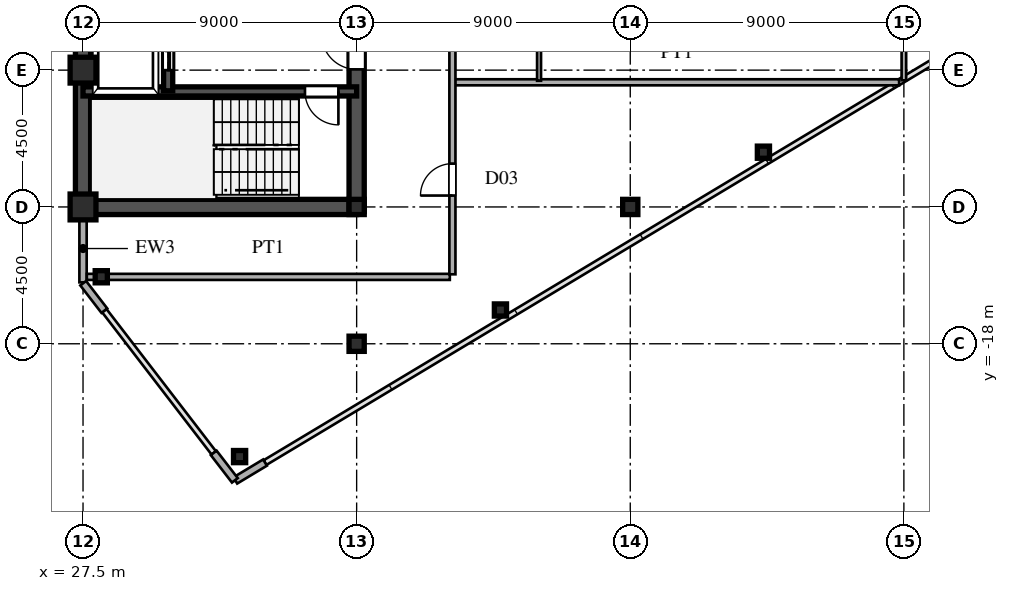
"""IFC4 building model, lengths in metres.
Left out: names, types, materials, properties, quantities, classifications, styles, units other than length and angle.
Written with IfcOpenShell. Run it as: python <this file> out.ifc"""

import sys

from ifc_helpers import new_model, si_unit, direction, frame, frame_2d, origin, origin_2d, place, context, subcontext, project, spatial, rectangle, hollow_rectangle, i_section, extrude, source, transform, mapped, element, fill, save


model = new_model("IFC4")
c1 = context("Model", 3, precision=1e-05, world=origin(), true_north=direction((0.0, 1.0)))
c2 = subcontext(c1, "Body", "Model", "MODEL_VIEW")
j1 = project(units=[si_unit("LENGTHUNIT", "METRE"), si_unit("PLANEANGLEUNIT", "RADIAN")], contexts=[c1])
p1 = place(None, origin())
s1 = spatial("IfcSite", under=j1, at=p1, CompositionType="ELEMENT")
p2 = place(p1, origin())
s2 = spatial("IfcBuilding", under=s1, at=p2, CompositionType="ELEMENT")
p3 = place(p2, frame((0.0, 0.0, 210.3)))
s3 = spatial("IfcBuildingStorey", under=s2, at=p3, CompositionType="ELEMENT", Elevation=210.3)
m1 = source(origin(), c2, "Body", "SweptSolid", [
    extrude(hollow_rectangle(XDim=0.85, YDim=0.85, WallThickness=0.036, at=origin_2d()), origin(), (0.0, 0.0, 1.0), 3.6),
])
for number, where, z_axis, x_axis in (
    (1, (27.5, -13.5, 0.0), (0.0, 0.0, 1.0), (1.0, 0.0, 0.0)),
    (2, (27.5, -9.0, 0.0), (0.0, 0.0, 1.0), (1.0, 0.0, 0.0)),
):
    element("IfcColumn", number, at=place(p3, frame(where, z_axis=z_axis, x_axis=x_axis)), inside=s3, PredefinedType="COLUMN", context=c2, shape_type="MappedRepresentation", body=[
        mapped(m1, transform((0.0, 0.0, 0.0), scale=1.0)),
    ])
m2 = source(origin(), c2, "Body", "SweptSolid", [
    extrude(i_section(OverallWidth=0.5, OverallDepth=0.5, WebThickness=0.02, FlangeThickness=0.032, at=origin_2d()), origin(), (0.0, 0.0, 1.0), 3.6),
])
for number, where, z_axis, x_axis in (
    (3, (36.5, -18.0, 0.0), (0.0, 0.0, 1.0), (1.0, 0.0, 0.0)),
    (4, (36.5, -13.5, 0.0), (0.0, 0.0, 1.0), (1.0, 0.0, 0.0)),
    (5, (45.5, -13.5, 0.0), (0.0, 0.0, 1.0), (1.0, 0.0, 0.0)),
):
    element("IfcColumn", number, at=place(p3, frame(where, z_axis=z_axis, x_axis=x_axis)), inside=s3, PredefinedType="COLUMN", context=c2, shape_type="MappedRepresentation", body=[
        mapped(m2, transform((0.0, 0.0, 0.0), scale=1.0)),
    ])
m3 = source(origin(), c2, "Body", "SweptSolid", [
    extrude(hollow_rectangle(XDim=0.4, YDim=0.4, WallThickness=0.016, at=origin_2d()), origin(), (0.0, 0.0, 1.0), 3.6),
])
for number, where, z_axis, x_axis in (
    (6, (32.65, -21.71, 0.0), (0.0, 0.0, 1.0), (1.0, 0.0, 0.0)),
    (7, (28.1, -15.796, 0.0), (0.0, 0.0, 1.0), (1.0, 0.0, 0.0)),
    (8, (41.23, -16.889, 0.0), (0.0, 0.0, 1.0), (1.0, 0.0, 0.0)),
    (9, (49.88, -11.699, 0.0), (0.0, 0.0, 1.0), (1.0, 0.0, 0.0)),
):
    element("IfcColumn", number, at=place(p3, frame(where, z_axis=z_axis, x_axis=x_axis)), inside=s3, PredefinedType="COLUMN", context=c2, shape_type="MappedRepresentation", body=[
        mapped(m3, transform((0.0, 0.0, 0.0), scale=1.0)),
    ])
p4 = place(p3, frame((32.509, -22.495, 0.0), z_axis=(0.0, 0.0, 1.0), x_axis=(0.85743623509, 0.514590228002, 0.0)))
e10 = element("IfcWall", 10, at=p4, inside=s3, PredefinedType="SOLIDWALL", context=c2, shape_type="SweptSolid", body=[
    extrude(rectangle(XDim=1.14, YDim=0.24, at=frame_2d((0.57, 0.0))), origin(), (0.0, 0.0, 1.0), 3.38),
])
p5 = place(p3, frame((27.5, -15.98, 0.0), z_axis=(0.0, 0.0, 1.0), x_axis=(0.0, 1.0, 0.0)))
e11 = element("IfcWall", 11, at=p5, inside=s3, PredefinedType="SOLIDWALL", context=c2, shape_type="SweptSolid", body=[
    extrude(rectangle(XDim=1.605, YDim=0.24, at=frame_2d((0.803, 0.0))), origin(), (0.0, 0.0, 1.0), 3.38),
])
p6 = place(p3, frame((27.5, -14.375, 0.0), z_axis=(0.0, 0.0, 1.0), x_axis=(0.0, 1.0, 0.0)))
e12 = element("IfcWall", 12, at=p6, inside=s3, PredefinedType="SOLIDWALL", context=c2, shape_type="SweptSolid", body=[
    extrude(rectangle(XDim=0.62, YDim=0.24, at=frame_2d((0.31, 0.0))), origin(), (0.0, 0.0, 1.0), 2.88),
])
for number, where, z_axis, x_axis in (
    (13, (27.506, -16.008, 0.0), (0.0, 0.0, 1.0), (0.61, -0.793, 0.0)),
    (14, (31.799, -21.588, 0.0), (0.0, 0.0, 1.0), (0.61, -0.793, 0.0)),
):
    element("IfcWall", number, at=place(p3, frame(where, z_axis=z_axis, x_axis=x_axis)), inside=s3, PredefinedType="SOLIDWALL", context=c2, shape_type="SweptSolid", body=[
        extrude(rectangle(XDim=1.14, YDim=0.24, at=frame_2d((0.57, 0.0))), origin(), (0.0, 0.0, 1.0), 3.38),
    ])
p7 = place(p3, frame((27.5, -13.5, 0.0), z_axis=(0.0, 0.0, 1.0), x_axis=(0.0, 1.0, 0.0)))
e15 = element("IfcWall", 15, at=p7, inside=s3, PredefinedType="SHEAR", context=c2, shape_type="SweptSolid", body=[
    extrude(rectangle(XDim=12.2, YDim=0.5, at=frame_2d((6.1, 0.0))), origin(), (0.0, 0.0, 1.0), 3.38),
])
p8 = place(p3, frame((27.5, -13.5, 0.0), z_axis=(0.0, 0.0, 1.0), x_axis=(1.0, 0.0, 0.0)))
e16 = element("IfcWall", 16, at=p8, inside=s3, PredefinedType="SHEAR", context=c2, shape_type="SweptSolid", body=[
    extrude(rectangle(XDim=9.0, YDim=0.5, at=frame_2d((4.5, 0.0))), origin(), (0.0, 0.0, 1.0), 3.38),
])
p9 = place(p3, frame((36.5, -13.65, 0.0), z_axis=(0.0, 0.0, 1.0), x_axis=(0.0, 1.0, 0.0)))
e17 = element("IfcWall", 17, at=p9, inside=s3, PredefinedType="SHEAR", context=c2, shape_type="SweptSolid", body=[
    extrude(rectangle(XDim=7.15, YDim=0.5, at=frame_2d((3.575, 0.0))), origin(), (0.0, 0.0, 1.0), 3.38),
])
p10 = place(p9, frame((4.675, 0.0, 0.0)))
e18 = element("IfcOpeningElement", 18, at=p10, cuts=e17, PredefinedType="OPENING", context=c2, shape_type="SweptSolid", body=[
    extrude(rectangle(XDim=1.15, YDim=2.2, at=frame_2d((0.575, 1.1))), frame((0.0, 0.26, 0.0), z_axis=(0.0, -1.0, 0.0), x_axis=(1.0, 0.0, 0.0)), (0.0, 0.0, 1.0), 0.52),
])
p11 = place(p3, frame((27.5, -9.7, 0.0), z_axis=(0.0, 0.0, 1.0), x_axis=(1.0, 0.0, 0.0)))
e19 = element("IfcWall", 19, at=p11, inside=s3, PredefinedType="SHEAR", context=c2, shape_type="SweptSolid", body=[
    extrude(rectangle(XDim=9.0, YDim=0.3, at=frame_2d((4.5, 0.0))), origin(), (0.0, 0.0, 1.0), 3.38),
])
p12 = place(p11, frame((7.3, 0.0, 0.0)))
e20 = element("IfcOpeningElement", 20, at=p12, cuts=e19, PredefinedType="OPENING", context=c2, shape_type="SweptSolid", body=[
    extrude(rectangle(XDim=1.1, YDim=2.2, at=frame_2d((0.55, 1.1))), frame((0.0, 0.16, 0.0), z_axis=(0.0, -1.0, 0.0), x_axis=(1.0, 0.0, 0.0)), (0.0, 0.0, 1.0), 0.32),
])
p13 = place(p3, frame((30.3, -9.68, 0.0), z_axis=(0.0, 0.0, 1.0), x_axis=(0.0, 1.0, 0.0)))
e21 = element("IfcWall", 21, at=p13, inside=s3, PredefinedType="SHEAR", context=c2, shape_type="SweptSolid", body=[
    extrude(rectangle(XDim=2.56, YDim=0.3, at=frame_2d((1.28, 0.0))), origin(), (0.0, 0.0, 1.0), 3.38),
])
p14 = place(p13, frame((0.68, 0.0, 0.0)))
e22 = element("IfcOpeningElement", 22, at=p14, cuts=e21, PredefinedType="OPENING", context=c2, shape_type="SweptSolid", body=[
    extrude(rectangle(XDim=1.2, YDim=2.25, at=frame_2d((0.6, 1.125))), frame((0.0, 0.16, 0.0), z_axis=(0.0, -1.0, 0.0), x_axis=(1.0, 0.0, 0.0)), (0.0, 0.0, 1.0), 0.32),
])
p15 = place(p3, frame((27.625, -15.8, 0.0), z_axis=(0.0, 0.0, 1.0), x_axis=(1.0, 0.0, 0.0)))
e23 = element("IfcWall", 23, at=p15, inside=s3, PredefinedType="PARTITIONING", context=c2, shape_type="SweptSolid", body=[
    extrude(rectangle(XDim=11.94, YDim=0.2, at=frame_2d((5.97, 0.0))), origin(), (0.0, 0.0, 1.0), 3.38),
])
p16 = place(p3, frame((39.73, -9.4, 0.0), z_axis=(0.0, 0.0, 1.0), x_axis=(1.0, 0.0, 0.0)))
e24 = element("IfcWall", 24, at=p16, inside=s3, PredefinedType="PARTITIONING", context=c2, shape_type="SweptSolid", body=[
    extrude(rectangle(XDim=14.613, YDim=0.2, at=frame_2d((7.307, 0.0))), origin(), (0.0, 0.0, 1.0), 3.38),
])
p17 = place(p3, frame((39.65, -15.715, 0.0), z_axis=(0.0, 0.0, 1.0), x_axis=(0.0, 1.0, 0.0)))
e25 = element("IfcWall", 25, at=p17, inside=s3, PredefinedType="PARTITIONING", context=c2, shape_type="SweptSolid", body=[
    extrude(rectangle(XDim=31.43, YDim=0.2, at=frame_2d((15.715, 0.0))), origin(), (0.0, 0.0, 1.0), 3.38),
])
p18 = place(p17, frame((2.59, 0.0, 0.0)))
e26 = element("IfcOpeningElement", 26, at=p18, cuts=e25, PredefinedType="OPENING", context=c2, shape_type="SweptSolid", body=[
    extrude(rectangle(XDim=1.05, YDim=2.25, at=frame_2d((0.525, 1.125))), frame((0.0, 0.11, 0.0), z_axis=(0.0, -1.0, 0.0), x_axis=(1.0, 0.0, 0.0)), (0.0, 0.0, 1.0), 0.22),
])
p19 = place(p17, frame((12.095, 0.0, 0.0)))
e27 = element("IfcOpeningElement", 27, at=p19, cuts=e25, PredefinedType="OPENING", context=c2, shape_type="SweptSolid", body=[
    extrude(rectangle(XDim=1.05, YDim=2.25, at=frame_2d((0.525, 1.125))), frame((0.0, 0.11, 0.0), z_axis=(0.0, -1.0, 0.0), x_axis=(1.0, 0.0, 0.0)), (0.0, 0.0, 1.0), 0.22),
])
p20 = place(p17, frame((24.89, 0.0, 0.0)))
e28 = element("IfcOpeningElement", 28, at=p20, cuts=e25, PredefinedType="OPENING", context=c2, shape_type="SweptSolid", body=[
    extrude(rectangle(XDim=1.05, YDim=2.25, at=frame_2d((0.525, 1.125))), frame((0.0, 0.11, 0.0), z_axis=(0.0, -1.0, 0.0), x_axis=(1.0, 0.0, 0.0)), (0.0, 0.0, 1.0), 0.22),
])
p21 = place(p3, frame((42.5, -9.35, 0.0), z_axis=(0.0, 0.0, 1.0), x_axis=(0.0, 1.0, 0.0)))
e29 = element("IfcWall", 29, at=p21, inside=s3, PredefinedType="PARTITIONING", context=c2, shape_type="SweptSolid", body=[
    extrude(rectangle(XDim=3.408, YDim=0.13, at=frame_2d((1.704, 0.0))), origin(), (0.0, 0.0, 1.0), 3.38),
])
p22 = place(p3, frame((54.5, -9.335, 0.0), z_axis=(0.0, 0.0, 1.0), x_axis=(0.0, 1.0, 0.0)))
e30 = element("IfcWall", 30, at=p22, inside=s3, PredefinedType="PARTITIONING", context=c2, shape_type="SweptSolid", body=[
    extrude(rectangle(XDim=12.885, YDim=0.15, at=frame_2d((6.442, 0.0))), origin(), (0.0, 0.0, 1.0), 2.78),
])
p23 = place(p22, frame((5.96, 0.0, 0.0)))
e31 = element("IfcOpeningElement", 31, at=p23, cuts=e30, PredefinedType="OPENING", context=c2, shape_type="SweptSolid", body=[
    extrude(rectangle(XDim=0.95, YDim=2.15, at=frame_2d((0.475, 1.075))), frame((0.0, 0.085, 0.0), z_axis=(0.0, -1.0, 0.0), x_axis=(1.0, 0.0, 0.0)), (0.0, 0.0, 1.0), 0.17),
])
p24 = place(p22, frame((1.677, 0.0, 0.0)))
e32 = element("IfcOpeningElement", 32, at=p24, cuts=e30, PredefinedType="OPENING", context=c2, shape_type="SweptSolid", body=[
    extrude(rectangle(XDim=0.95, YDim=2.15, at=frame_2d((0.475, 1.075))), frame((0.0, 0.085, 0.0), z_axis=(0.0, -1.0, 0.0), x_axis=(1.0, 0.0, 0.0)), (0.0, 0.0, 1.0), 0.17),
])
p25 = place(p22, frame((10.293, 0.0, 0.0)))
e33 = element("IfcOpeningElement", 33, at=p25, cuts=e30, PredefinedType="OPENING", context=c2, shape_type="SweptSolid", body=[
    extrude(rectangle(XDim=0.95, YDim=2.15, at=frame_2d((0.475, 1.075))), frame((0.0, 0.085, 0.0), z_axis=(0.0, -1.0, 0.0), x_axis=(1.0, 0.0, 0.0)), (0.0, 0.0, 1.0), 0.17),
])
m4 = source(origin(), c2, "Body", "SweptSolid", [
    extrude(rectangle(XDim=1.15, YDim=2.2, at=frame_2d((0.575, 1.1))), frame((0.0, 0.025, 0.0), z_axis=(0.0, -1.0, 0.0), x_axis=(1.0, 0.0, 0.0)), (0.0, 0.0, 1.0), 0.05),
])
p26 = place(p10, origin())
e34 = element("IfcDoor", 34, at=p26, inside=s3, OperationType="SINGLE_SWING_RIGHT", PredefinedType="DOOR", context=c2, shape_type="MappedRepresentation", body=[
    mapped(m4, transform((0.0, 0.0, 0.0), scale=1.0)),
])
fill(e18, e34)
m5 = source(origin(), c2, "Body", "SweptSolid", [
    extrude(rectangle(XDim=1.1, YDim=2.2, at=frame_2d((0.55, 1.1))), frame((0.0, 0.025, 0.0), z_axis=(0.0, -1.0, 0.0), x_axis=(1.0, 0.0, 0.0)), (0.0, 0.0, 1.0), 0.05),
])
p27 = place(p12, frame((1.1, 0.0, 0.0), z_axis=(0.0, 0.0, 1.0), x_axis=(-1.0, 0.0, 0.0)))
e35 = element("IfcDoor", 35, at=p27, inside=s3, OperationType="SINGLE_SWING_RIGHT", PredefinedType="DOOR", context=c2, shape_type="MappedRepresentation", body=[
    mapped(m5, transform((0.0, 0.0, 0.0), scale=1.0)),
])
fill(e20, e35)
m6 = source(origin(), c2, "Body", "SweptSolid", [
    extrude(rectangle(XDim=1.2, YDim=2.25, at=frame_2d((0.6, 1.125))), frame((0.0, 0.025, 0.0), z_axis=(0.0, -1.0, 0.0), x_axis=(1.0, 0.0, 0.0)), (0.0, 0.0, 1.0), 0.05),
])
p28 = place(p14, origin())
e36 = element("IfcDoor", 36, at=p28, inside=s3, OperationType="DOUBLE_DOOR_SLIDING", PredefinedType="DOOR", context=c2, shape_type="MappedRepresentation", body=[
    mapped(m6, transform((0.0, 0.0, 0.0), scale=1.0)),
])
fill(e22, e36)
m7 = source(origin(), c2, "Body", "SweptSolid", [
    extrude(rectangle(XDim=1.05, YDim=2.25, at=frame_2d((0.525, 1.125))), frame((0.0, 0.025, 0.0), z_axis=(0.0, -1.0, 0.0), x_axis=(1.0, 0.0, 0.0)), (0.0, 0.0, 1.0), 0.05),
])
p29 = place(p18, origin())
e37 = element("IfcDoor", 37, at=p29, inside=s3, OperationType="SINGLE_SWING_LEFT", PredefinedType="DOOR", context=c2, shape_type="MappedRepresentation", body=[
    mapped(m7, transform((0.0, 0.0, 0.0), scale=1.0)),
])
fill(e26, e37)
save(model, sys.argv[1])
